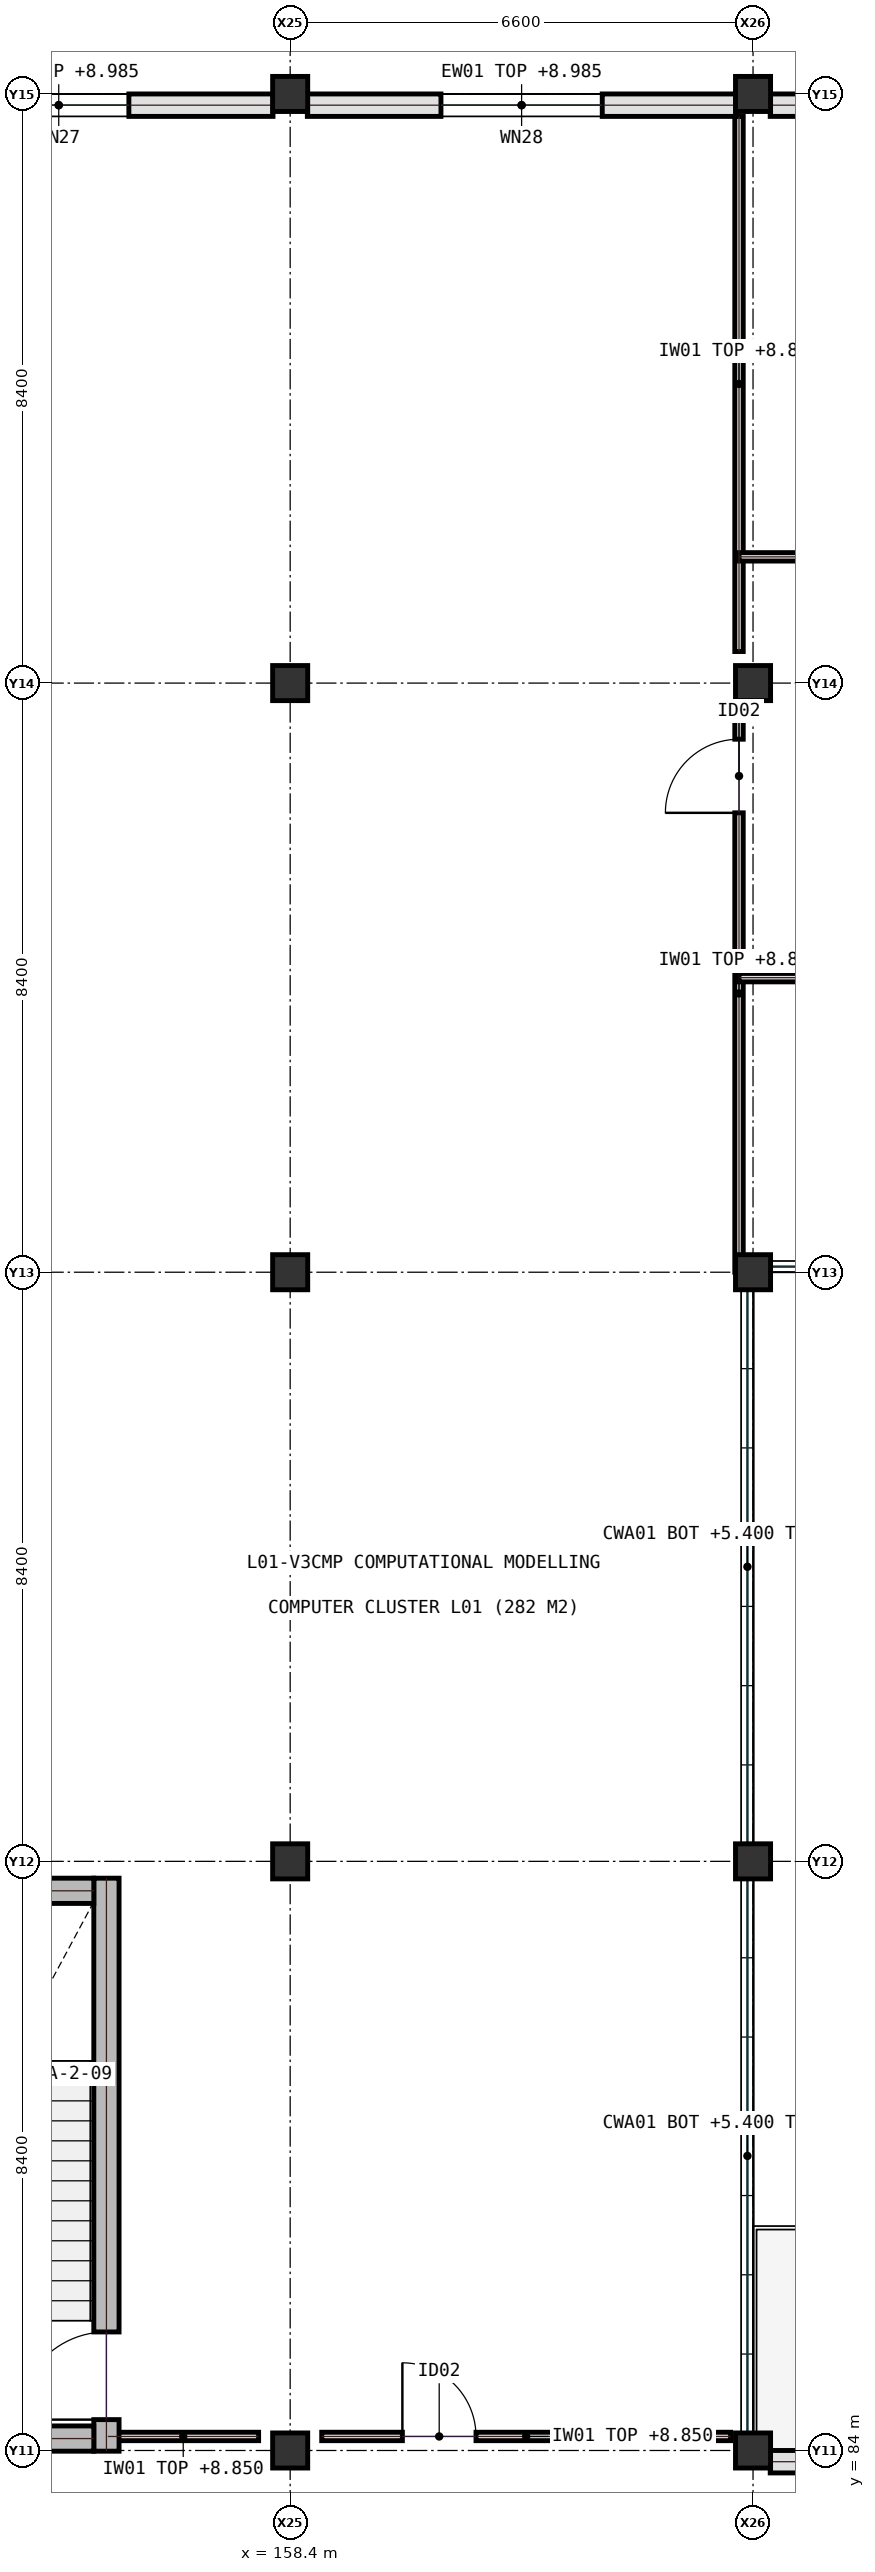
"""IFC4 building model, lengths in metres.
Left out: names, types, materials, properties, quantities, classifications, styles, units other than length and angle.
Written with IfcOpenShell. Run it as: python <this file> out.ifc"""

import sys

from ifc_helpers import new_model, si_unit, direction, frame, frame_2d, origin, origin_2d, place, context, subcontext, project, spatial, rectangle, extrude, element, fill, save


model = new_model("IFC4")
c1 = context("Model", 3, precision=1e-05, world=origin(), true_north=direction((0.0, 1.0)))
c2 = subcontext(c1, "Body", "Model", "MODEL_VIEW")
j1 = project(units=[si_unit("LENGTHUNIT", "METRE"), si_unit("PLANEANGLEUNIT", "RADIAN")], contexts=[c1])
p1 = place(None, origin())
s1 = spatial("IfcSite", under=j1, at=p1, CompositionType="ELEMENT")
p2 = place(p1, origin())
s2 = spatial("IfcBuilding", under=s1, at=p2, CompositionType="ELEMENT")
p3 = place(p2, frame((0.0, 0.0, 5.4)))
s3 = spatial("IfcBuildingStorey", under=s2, at=p3, CompositionType="ELEMENT", Elevation=5.4)
for number, where, z_axis, x_axis in (
    (1, (158.4, 84.0, 0.0), (0.0, 0.0, 1.0), (1.0, 0.0, 0.0)),
    (2, (158.4, 92.4, 0.0), (0.0, 0.0, 1.0), (1.0, 0.0, 0.0)),
    (3, (158.4, 100.8, 0.0), (0.0, 0.0, 1.0), (1.0, 0.0, 0.0)),
    (4, (158.4, 109.2, 0.0), (0.0, 0.0, 1.0), (1.0, 0.0, 0.0)),
    (5, (158.4, 117.6, 0.0), (0.0, 0.0, 1.0), (1.0, 0.0, 0.0)),
    (6, (165.0, 84.0, 0.0), (0.0, 0.0, 1.0), (1.0, 0.0, 0.0)),
    (7, (165.0, 92.4, 0.0), (0.0, 0.0, 1.0), (1.0, 0.0, 0.0)),
    (8, (165.0, 100.8, 0.0), (0.0, 0.0, 1.0), (1.0, 0.0, 0.0)),
    (9, (165.0, 109.2, 0.0), (0.0, 0.0, 1.0), (1.0, 0.0, 0.0)),
    (10, (165.0, 117.6, 0.0), (0.0, 0.0, 1.0), (1.0, 0.0, 0.0)),
):
    element("IfcColumn", number, at=place(p3, frame(where, z_axis=z_axis, x_axis=x_axis)), inside=s3, PredefinedType="COLUMN", context=c2, shape_type="SweptSolid", body=[
        extrude(rectangle(XDim=0.5, YDim=0.5, at=origin_2d()), origin(), (0.0, 0.0, 1.0), 4.5),
    ])
p4 = place(p3, frame((155.8, 84.2, 0.0), z_axis=(0.0, 0.0, 1.0), x_axis=(1.0, 0.0, 0.0)))
e11 = element("IfcWall", 11, at=p4, inside=s3, PredefinedType="PARTITIONING", context=c2, shape_type="SweptSolid", body=[
    extrude(rectangle(XDim=2.15, YDim=0.12, at=frame_2d((1.075, 0.0))), origin(), (0.0, 0.0, 1.0), 3.45),
])
p5 = place(p3, frame((158.85, 84.2, 0.0), z_axis=(0.0, 0.0, 1.0), x_axis=(1.0, 0.0, 0.0)))
e12 = element("IfcWall", 12, at=p5, inside=s3, PredefinedType="PARTITIONING", context=c2, shape_type="SweptSolid", body=[
    extrude(rectangle(XDim=5.83, YDim=0.12, at=frame_2d((2.915, 0.0))), origin(), (0.0, 0.0, 1.0), 3.45),
])
p6 = place(p5, frame((1.15, 0.0, 0.0)))
e13 = element("IfcOpeningElement", 13, at=p6, cuts=e12, PredefinedType="OPENING", context=c2, shape_type="SweptSolid", body=[
    extrude(rectangle(XDim=1.05, YDim=2.15, at=frame_2d((0.525, 1.075))), frame((0.0, 0.07, 0.0), z_axis=(0.0, -1.0, 0.0), x_axis=(1.0, 0.0, 0.0)), (0.0, 0.0, 1.0), 0.14),
])
p7 = place(p3, frame((164.8, 100.8, 0.0), z_axis=(0.0, 0.0, 1.0), x_axis=(0.0, 1.0, 0.0)))
e14 = element("IfcWall", 14, at=p7, inside=s3, PredefinedType="PARTITIONING", context=c2, shape_type="SweptSolid", body=[
    extrude(rectangle(XDim=7.95, YDim=0.12, at=frame_2d((3.975, 0.0))), origin(), (0.0, 0.0, 1.0), 3.45),
])
p8 = place(p7, frame((6.55, 0.0, 0.0)))
e15 = element("IfcOpeningElement", 15, at=p8, cuts=e14, PredefinedType="OPENING", context=c2, shape_type="SweptSolid", body=[
    extrude(rectangle(XDim=1.05, YDim=2.15, at=frame_2d((0.525, 1.075))), frame((0.0, 0.07, 0.0), z_axis=(0.0, -1.0, 0.0), x_axis=(1.0, 0.0, 0.0)), (0.0, 0.0, 1.0), 0.14),
])
p9 = place(p3, frame((164.8, 109.65, 0.0), z_axis=(0.0, 0.0, 1.0), x_axis=(0.0, 1.0, 0.0)))
e16 = element("IfcWall", 16, at=p9, inside=s3, PredefinedType="PARTITIONING", context=c2, shape_type="SweptSolid", body=[
    extrude(rectangle(XDim=7.63, YDim=0.12, at=frame_2d((3.815, 0.0))), origin(), (0.0, 0.0, 1.0), 3.45),
])
p10 = place(p3, frame((164.8, 105.0, 0.0), z_axis=(0.0, 0.0, 1.0), x_axis=(1.0, 0.0, 0.0)))
e17 = element("IfcWall", 17, at=p10, inside=s3, PredefinedType="PARTITIONING", context=c2, shape_type="SweptSolid", body=[
    extrude(rectangle(XDim=13.2, YDim=0.12, at=frame_2d((6.6, 0.0))), origin(), (0.0, 0.0, 1.0), 3.45),
])
p11 = place(p10, frame((4.0, 0.0, 0.0)))
e18 = element("IfcOpeningElement", 18, at=p11, cuts=e17, PredefinedType="OPENING", context=c2, shape_type="SweptSolid", body=[
    extrude(rectangle(XDim=1.15, YDim=2.2, at=frame_2d((0.575, 1.1))), frame((0.0, 0.07, 0.0), z_axis=(0.0, -1.0, 0.0), x_axis=(1.0, 0.0, 0.0)), (0.0, 0.0, 1.0), 0.14),
])
p12 = place(p10, frame((9.0, 0.0, 0.0)))
e19 = element("IfcOpeningElement", 19, at=p12, cuts=e17, PredefinedType="OPENING", context=c2, shape_type="SweptSolid", body=[
    extrude(rectangle(XDim=1.15, YDim=2.2, at=frame_2d((0.575, 1.1))), frame((0.0, 0.07, 0.0), z_axis=(0.0, -1.0, 0.0), x_axis=(1.0, 0.0, 0.0)), (0.0, 0.0, 1.0), 0.14),
])
p13 = place(p3, frame((164.8, 111.0, 0.0), z_axis=(0.0, 0.0, 1.0), x_axis=(1.0, 0.0, 0.0)))
e20 = element("IfcWall", 20, at=p13, inside=s3, PredefinedType="PARTITIONING", context=c2, shape_type="SweptSolid", body=[
    extrude(rectangle(XDim=13.2, YDim=0.12, at=frame_2d((6.6, 0.0))), origin(), (0.0, 0.0, 1.0), 3.45),
])
p14 = place(p13, frame((4.0, 0.0, 0.0)))
e21 = element("IfcOpeningElement", 21, at=p14, cuts=e20, PredefinedType="OPENING", context=c2, shape_type="SweptSolid", body=[
    extrude(rectangle(XDim=1.45, YDim=2.25, at=frame_2d((0.725, 1.125))), frame((0.0, 0.07, 0.0), z_axis=(0.0, -1.0, 0.0), x_axis=(1.0, 0.0, 0.0)), (0.0, 0.0, 1.0), 0.14),
])
p15 = place(p13, frame((9.0, 0.0, 0.0)))
e22 = element("IfcOpeningElement", 22, at=p15, cuts=e20, PredefinedType="OPENING", context=c2, shape_type="SweptSolid", body=[
    extrude(rectangle(XDim=1.45, YDim=2.25, at=frame_2d((0.725, 1.125))), frame((0.0, 0.07, 0.0), z_axis=(0.0, -1.0, 0.0), x_axis=(1.0, 0.0, 0.0)), (0.0, 0.0, 1.0), 0.14),
])
p16 = place(p3, frame((158.155, 117.44, 0.0), z_axis=(0.0, 0.0, 1.0), x_axis=(-1.0, 0.0, 0.0)))
e23 = element("IfcWall", 23, at=p16, inside=s3, PredefinedType="SOLIDWALL", context=c2, shape_type="SweptSolid", body=[
    extrude(rectangle(XDim=6.11, YDim=0.32, at=frame_2d((3.055, 0.0))), origin(), (0.0, 0.0, 1.0), 3.585),
])
p17 = place(p16, frame((2.055, 0.0, 0.95)))
e24 = element("IfcOpeningElement", 24, at=p17, cuts=e23, PredefinedType="OPENING", context=c2, shape_type="SweptSolid", body=[
    extrude(rectangle(XDim=2.0, YDim=1.95, at=frame_2d((1.0, 0.975))), frame((0.0, 0.17, 0.0), z_axis=(0.0, -1.0, 0.0), x_axis=(1.0, 0.0, 0.0)), (0.0, 0.0, 1.0), 0.34),
])
p18 = place(p3, frame((164.755, 117.44, 0.0), z_axis=(0.0, 0.0, 1.0), x_axis=(-1.0, 0.0, 0.0)))
e25 = element("IfcWall", 25, at=p18, inside=s3, PredefinedType="SOLIDWALL", context=c2, shape_type="SweptSolid", body=[
    extrude(rectangle(XDim=6.11, YDim=0.32, at=frame_2d((3.055, 0.0))), origin(), (0.0, 0.0, 1.0), 3.585),
])
p19 = place(p18, frame((1.905, 0.0, 0.95)))
e26 = element("IfcOpeningElement", 26, at=p19, cuts=e25, PredefinedType="OPENING", context=c2, shape_type="SweptSolid", body=[
    extrude(rectangle(XDim=2.3, YDim=1.95, at=frame_2d((1.15, 0.975))), frame((0.0, 0.17, 0.0), z_axis=(0.0, -1.0, 0.0), x_axis=(1.0, 0.0, 0.0)), (0.0, 0.0, 1.0), 0.34),
])
p20 = place(p3, frame((171.355, 83.84, 0.0), z_axis=(0.0, 0.0, 1.0), x_axis=(-1.0, 0.0, 0.0)))
e27 = element("IfcWall", 27, at=p20, inside=s3, PredefinedType="SOLIDWALL", context=c2, shape_type="SweptSolid", body=[
    extrude(rectangle(XDim=6.11, YDim=0.32, at=frame_2d((3.055, 0.0))), origin(), (0.0, 0.0, 1.0), 3.585),
])
p21 = place(p20, frame((2.505, 0.0, 0.0)))
e28 = element("IfcOpeningElement", 28, at=p21, cuts=e27, PredefinedType="OPENING", context=c2, shape_type="SweptSolid", body=[
    extrude(rectangle(XDim=1.1, YDim=2.2, at=frame_2d((0.55, 1.1))), frame((0.0, 0.17, 0.0), z_axis=(0.0, -1.0, 0.0), x_axis=(1.0, 0.0, 0.0)), (0.0, 0.0, 1.0), 0.34),
])
p22 = place(p3, frame((171.355, 117.44, 0.0), z_axis=(0.0, 0.0, 1.0), x_axis=(-1.0, 0.0, 0.0)))
e29 = element("IfcWall", 29, at=p22, inside=s3, PredefinedType="SOLIDWALL", context=c2, shape_type="SweptSolid", body=[
    extrude(rectangle(XDim=6.11, YDim=0.32, at=frame_2d((3.055, 0.0))), origin(), (0.0, 0.0, 1.0), 3.585),
])
p23 = place(p22, frame((1.855, 0.0, 0.95)))
e30 = element("IfcOpeningElement", 30, at=p23, cuts=e29, PredefinedType="OPENING", context=c2, shape_type="SweptSolid", body=[
    extrude(rectangle(XDim=2.4, YDim=1.6, at=frame_2d((1.2, 0.8))), frame((0.0, 0.17, 0.0), z_axis=(0.0, -1.0, 0.0), x_axis=(1.0, 0.0, 0.0)), (0.0, 0.0, 1.0), 0.34),
])
p24 = place(p3, frame((155.78, 83.99, 0.0), z_axis=(0.0, 0.0, 1.0), x_axis=(0.0, 1.0, 0.0)))
e31 = element("IfcWall", 31, at=p24, inside=s3, PredefinedType="SHEAR", context=c2, shape_type="SweptSolid", body=[
    extrude(rectangle(XDim=8.17, YDim=0.36, at=frame_2d((4.085, 0.0))), origin(), (0.0, 0.0, 1.0), 4.2),
])
p25 = place(p24, frame((0.45, 0.0, 0.0)))
e32 = element("IfcOpeningElement", 32, at=p25, cuts=e31, PredefinedType="OPENING", context=c2, shape_type="SweptSolid", body=[
    extrude(rectangle(XDim=1.25, YDim=2.15, at=frame_2d((0.625, 1.075))), frame((0.0, 0.19, 0.0), z_axis=(0.0, -1.0, 0.0), x_axis=(1.0, 0.0, 0.0)), (0.0, 0.0, 1.0), 0.38),
])
for number, where, z_axis, x_axis in (
    (33, (152.4, 91.98, 0.0), (0.0, 0.0, 1.0), (1.0, 0.0, 0.0)),
    (34, (152.4, 84.17, 0.0), (0.0, 0.0, 1.0), (1.0, 0.0, 0.0)),
):
    element("IfcWall", number, at=place(p3, frame(where, z_axis=z_axis, x_axis=x_axis)), inside=s3, PredefinedType="SHEAR", context=c2, shape_type="SweptSolid", body=[
        extrude(rectangle(XDim=3.2, YDim=0.36, at=frame_2d((1.6, 0.0))), origin(), (0.0, 0.0, 1.0), 4.2),
    ])
p26 = place(p6, origin())
e35 = element("IfcDoor", 35, at=p26, inside=s3, OperationType="SINGLE_SWING_LEFT", PredefinedType="DOOR", context=c2, shape_type="SweptSolid", body=[
    extrude(rectangle(XDim=1.05, YDim=2.15, at=frame_2d((0.525, 1.075))), frame((0.0, 0.025, 0.0), z_axis=(0.0, -1.0, 0.0), x_axis=(1.0, 0.0, 0.0)), (0.0, 0.0, 1.0), 0.05),
])
fill(e13, e35)
p27 = place(p8, origin())
e36 = element("IfcDoor", 36, at=p27, inside=s3, OperationType="SINGLE_SWING_LEFT", PredefinedType="DOOR", context=c2, shape_type="SweptSolid", body=[
    extrude(rectangle(XDim=1.05, YDim=2.15, at=frame_2d((0.525, 1.075))), frame((0.0, 0.025, 0.0), z_axis=(0.0, -1.0, 0.0), x_axis=(1.0, 0.0, 0.0)), (0.0, 0.0, 1.0), 0.05),
])
fill(e15, e36)
p28 = place(p17, origin())
e37 = element("IfcWindow", 37, at=p28, inside=s3, PartitioningType="SINGLE_PANEL", PredefinedType="WINDOW", context=c2, shape_type="SweptSolid", body=[
    extrude(rectangle(XDim=2.0, YDim=1.95, at=frame_2d((1.0, 0.975))), frame((0.0, 0.03, 0.0), z_axis=(0.0, -1.0, 0.0), x_axis=(1.0, 0.0, 0.0)), (0.0, 0.0, 1.0), 0.06),
])
fill(e24, e37)
p29 = place(p19, origin())
e38 = element("IfcWindow", 38, at=p29, inside=s3, PartitioningType="SINGLE_PANEL", PredefinedType="WINDOW", context=c2, shape_type="SweptSolid", body=[
    extrude(rectangle(XDim=2.3, YDim=1.95, at=frame_2d((1.15, 0.975))), frame((0.0, 0.03, 0.0), z_axis=(0.0, -1.0, 0.0), x_axis=(1.0, 0.0, 0.0)), (0.0, 0.0, 1.0), 0.06),
])
fill(e26, e38)
p30 = place(p25, origin())
e39 = element("IfcDoor", 39, at=p30, inside=s3, OperationType="SINGLE_SWING_LEFT", PredefinedType="DOOR", context=c2, shape_type="SweptSolid", body=[
    extrude(rectangle(XDim=1.25, YDim=2.15, at=frame_2d((0.625, 1.075))), frame((0.0, 0.025, 0.0), z_axis=(0.0, -1.0, 0.0), x_axis=(1.0, 0.0, 0.0)), (0.0, 0.0, 1.0), 0.05),
])
fill(e32, e39)
save(model, sys.argv[1])
